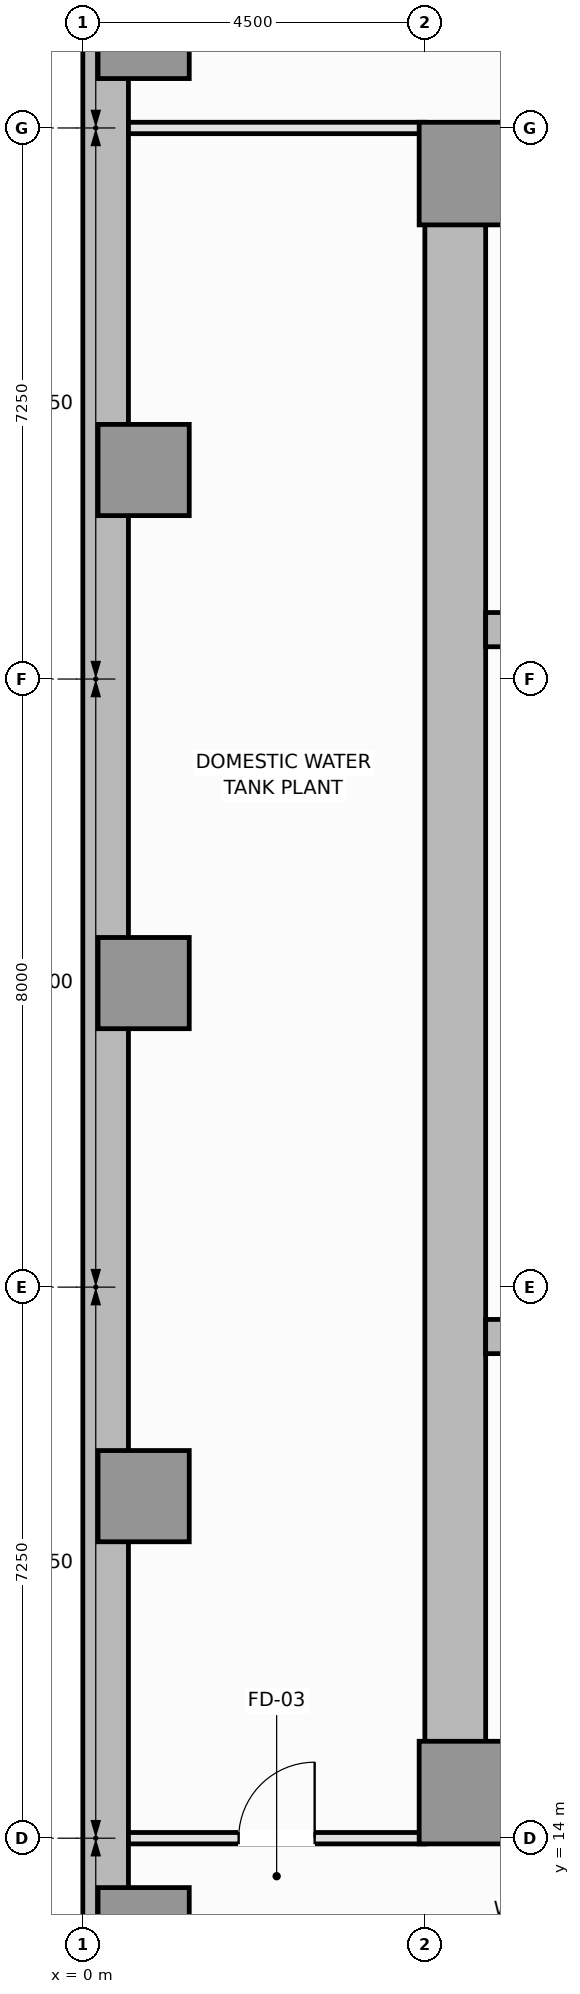
"""IFC4 building model, lengths in metres.
Left out: names, types, materials, properties, quantities, classifications, styles, units other than length and angle.
Written with IfcOpenShell. Run it as: python <this file> out.ifc"""

import sys

from ifc_helpers import new_model, si_unit, direction, frame, frame_2d, origin, origin_2d, place, context, subcontext, project, spatial, rectangle, extrude, element, fill, save


model = new_model("IFC4")
c1 = context("Model", 3, precision=1e-05, world=origin(), true_north=direction((0.0, 1.0)))
c2 = subcontext(c1, "Body", "Model", "MODEL_VIEW")
j1 = project(units=[si_unit("LENGTHUNIT", "METRE"), si_unit("PLANEANGLEUNIT", "RADIAN")], contexts=[c1])
p1 = place(None, origin())
s1 = spatial("IfcSite", under=j1, at=p1, CompositionType="ELEMENT")
p2 = place(p1, origin())
s2 = spatial("IfcBuilding", under=s1, at=p2, CompositionType="ELEMENT")
p3 = place(p2, frame((0.0, 0.0, -9.0)))
s3 = spatial("IfcBuildingStorey", under=s2, at=p3, CompositionType="ELEMENT", Elevation=-9.0)
p4 = place(p3, frame((0.3, 0.6, 0.0), z_axis=(0.0, 0.0, 1.0), x_axis=(0.0, 1.0, 0.0)))
e1 = element("IfcWall", 1, at=p4, inside=s3, PredefinedType="USERDEFINED", context=c2, shape_type="SweptSolid", body=[
    extrude(rectangle(XDim=49.3, YDim=0.6, at=frame_2d((24.65, 0.0))), origin(), (0.0, 0.0, 1.0), 4.2),
])
for number, where, z_axis, x_axis in (
    (2, (4.5, 14.4, 0.0), (0.0, 0.0, 1.0), (1.0, 0.0, 0.0)),
    (3, (4.5, 36.1, 0.0), (0.0, 0.0, 1.0), (1.0, 0.0, 0.0)),
):
    element("IfcWall", number, at=place(p3, frame(where, z_axis=z_axis, x_axis=x_axis)), inside=s3, PredefinedType="SHEAR", context=c2, shape_type="SweptSolid", body=[
        extrude(rectangle(XDim=13.5, YDim=0.8, at=frame_2d((6.75, 0.0))), origin(), (0.0, 0.0, 1.0), 4.2),
    ])
p5 = place(p3, frame((4.9, 14.8, 0.0), z_axis=(0.0, 0.0, 1.0), x_axis=(0.0, 1.0, 0.0)))
e4 = element("IfcWall", 4, at=p5, inside=s3, PredefinedType="SHEAR", context=c2, shape_type="SweptSolid", body=[
    extrude(rectangle(XDim=20.9, YDim=0.8, at=frame_2d((10.45, 0.0))), origin(), (0.0, 0.0, 1.0), 4.2),
])
for number, where, z_axis, x_axis in (
    (5, (5.3, 20.6, 0.0), (0.0, 0.0, 1.0), (1.0, 0.0, 0.0)),
    (6, (5.3, 29.9, 0.0), (0.0, 0.0, 1.0), (1.0, 0.0, 0.0)),
):
    element("IfcWall", number, at=place(p3, frame(where, z_axis=z_axis, x_axis=x_axis)), inside=s3, PredefinedType="SHEAR", context=c2, shape_type="SweptSolid", body=[
        extrude(rectangle(XDim=11.9, YDim=0.45, at=frame_2d((5.95, 0.0))), origin(), (0.0, 0.0, 1.0), 4.2),
    ])
for number, where, z_axis, x_axis in (
    (7, (5.1, 14.6, 0.0), (0.0, 0.0, 1.0), (1.0, 0.0, 0.0)),
    (8, (5.1, 35.9, 0.0), (0.0, 0.0, 1.0), (1.0, 0.0, 0.0)),
):
    element("IfcColumn", number, at=place(p3, frame(where, z_axis=z_axis, x_axis=x_axis)), inside=s3, PredefinedType="PILASTER", context=c2, shape_type="SweptSolid", body=[
        extrude(rectangle(XDim=1.35, YDim=1.35, at=origin_2d()), origin(), (0.0, 0.0, 1.0), 4.2),
    ])
for number, where, z_axis, x_axis in (
    (9, (0.8, 12.75, 0.0), (0.0, 0.0, 1.0), (1.0, 0.0, 0.0)),
    (10, (0.8, 18.5, 0.0), (0.0, 0.0, 1.0), (1.0, 0.0, 0.0)),
    (11, (0.8, 25.25, 0.0), (0.0, 0.0, 1.0), (1.0, 0.0, 0.0)),
    (12, (0.8, 32.0, 0.0), (0.0, 0.0, 1.0), (1.0, 0.0, 0.0)),
    (13, (0.8, 37.75, 0.0), (0.0, 0.0, 1.0), (1.0, 0.0, 0.0)),
):
    element("IfcColumn", number, at=place(p3, frame(where, z_axis=z_axis, x_axis=x_axis)), inside=s3, PredefinedType="COLUMN", context=c2, shape_type="SweptSolid", body=[
        extrude(rectangle(XDim=1.2, YDim=1.2, at=origin_2d()), origin(), (0.0, 0.0, 1.0), 4.2),
    ])
p6 = place(p3, frame((0.6, 14.0, 0.0), z_axis=(0.0, 0.0, 1.0), x_axis=(1.0, 0.0, 0.0)))
e14 = element("IfcWall", 14, at=p6, inside=s3, PredefinedType="PARTITIONING", context=c2, shape_type="SweptSolid", body=[
    extrude(rectangle(XDim=3.9, YDim=0.15, at=frame_2d((1.95, 0.0))), origin(), (0.0, 0.0, 1.0), 4.0),
])
p7 = place(p6, frame((1.45, 0.0, 0.0)))
e15 = element("IfcOpeningElement", 15, at=p7, cuts=e14, PredefinedType="OPENING", context=c2, shape_type="SweptSolid", body=[
    extrude(rectangle(XDim=1.0, YDim=2.15, at=frame_2d((0.5, 1.075))), frame((0.0, 0.085, 0.0), z_axis=(0.0, -1.0, 0.0), x_axis=(1.0, 0.0, 0.0)), (0.0, 0.0, 1.0), 0.17),
])
p8 = place(p3, frame((0.6, 36.5, 0.0), z_axis=(0.0, 0.0, 1.0), x_axis=(1.0, 0.0, 0.0)))
e16 = element("IfcWall", 16, at=p8, inside=s3, PredefinedType="PARTITIONING", context=c2, shape_type="SweptSolid", body=[
    extrude(rectangle(XDim=3.9, YDim=0.15, at=frame_2d((1.95, 0.0))), origin(), (0.0, 0.0, 1.0), 4.0),
])
p9 = place(p7, origin())
e17 = element("IfcDoor", 17, at=p9, inside=s3, OperationType="SINGLE_SWING_RIGHT", PredefinedType="DOOR", context=c2, shape_type="SweptSolid", body=[
    extrude(rectangle(XDim=1.0, YDim=2.15, at=frame_2d((0.5, 1.075))), frame((0.0, 0.025, 0.0), z_axis=(0.0, -1.0, 0.0), x_axis=(1.0, 0.0, 0.0)), (0.0, 0.0, 1.0), 0.05),
])
fill(e15, e17)
save(model, sys.argv[1])
